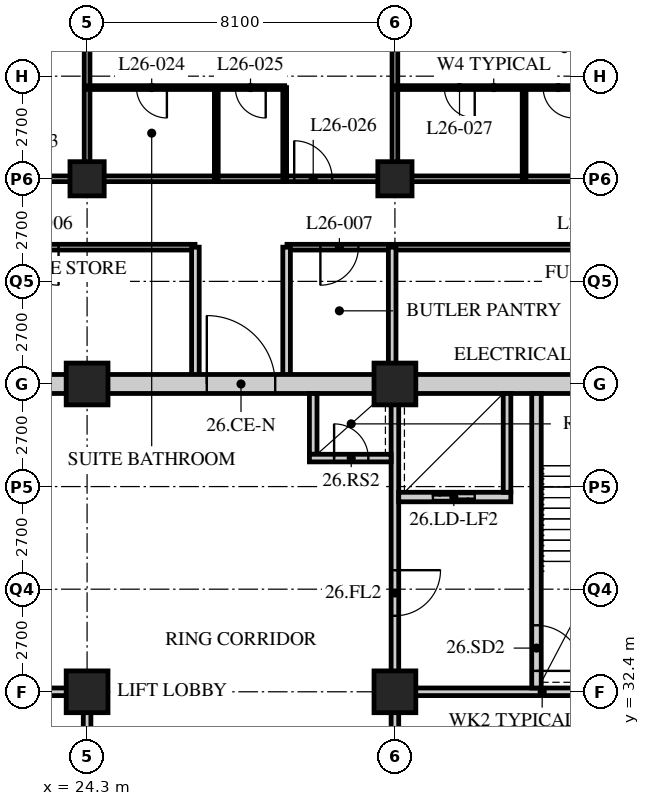
"""IFC4 building model, lengths in metres.
Left out: names, types, materials, properties, quantities, classifications, styles, units other than length and angle.
Written with IfcOpenShell. Run it as: python <this file> out.ifc"""

import sys

from ifc_helpers import new_model, si_unit, direction, frame, frame_2d, origin, origin_2d, place, context, subcontext, project, spatial, rectangle, hollow_rectangle, extrude, element, fill, save


model = new_model("IFC4")
c1 = context("Model", 3, precision=1e-05, world=origin(), true_north=direction((0.0, 1.0)))
c2 = subcontext(c1, "Body", "Model", "MODEL_VIEW")
j1 = project(units=[si_unit("LENGTHUNIT", "METRE"), si_unit("PLANEANGLEUNIT", "RADIAN")], contexts=[c1])
p1 = place(None, origin())
s1 = spatial("IfcSite", under=j1, at=p1, CompositionType="ELEMENT")
p2 = place(p1, origin())
s2 = spatial("IfcBuilding", under=s1, at=p2, CompositionType="ELEMENT")
p3 = place(p2, frame((0.0, 0.0, 106.8)))
s3 = spatial("IfcBuildingStorey", under=s2, at=p3, CompositionType="ELEMENT", Elevation=106.8)
for number, where, z_axis, x_axis in (
    (1, (24.3, 32.4, 0.0), (0.0, 0.0, 1.0), (1.0, 0.0, 0.0)),
    (2, (24.3, 40.5, 0.0), (0.0, 0.0, 1.0), (1.0, 0.0, 0.0)),
):
    element("IfcColumn", number, at=place(p3, frame(where, z_axis=z_axis, x_axis=x_axis)), inside=s3, PredefinedType="COLUMN", context=c2, shape_type="SweptSolid", body=[
        extrude(hollow_rectangle(XDim=1.1, YDim=1.1, WallThickness=0.1, at=origin_2d()), origin(), (0.0, 0.0, 1.0), 3.4),
    ])
p4 = place(p3, frame((24.3, 45.9, 0.0), z_axis=(0.0, 0.0, 1.0), x_axis=(1.0, 0.0, 0.0)))
e3 = element("IfcColumn", 3, at=p4, inside=s3, PredefinedType="COLUMN", context=c2, shape_type="SweptSolid", body=[
    extrude(hollow_rectangle(XDim=0.9, YDim=0.9, WallThickness=0.09, at=origin_2d()), origin(), (0.0, 0.0, 1.0), 3.4),
])
for number, where, z_axis, x_axis in (
    (4, (32.4, 32.4, 0.0), (0.0, 0.0, 1.0), (1.0, 0.0, 0.0)),
    (5, (32.4, 40.5, 0.0), (0.0, 0.0, 1.0), (1.0, 0.0, 0.0)),
):
    element("IfcColumn", number, at=place(p3, frame(where, z_axis=z_axis, x_axis=x_axis)), inside=s3, PredefinedType="COLUMN", context=c2, shape_type="SweptSolid", body=[
        extrude(hollow_rectangle(XDim=1.1, YDim=1.1, WallThickness=0.1, at=origin_2d()), origin(), (0.0, 0.0, 1.0), 3.4),
    ])
p5 = place(p3, frame((32.4, 45.9, 0.0), z_axis=(0.0, 0.0, 1.0), x_axis=(1.0, 0.0, 0.0)))
e6 = element("IfcColumn", 6, at=p5, inside=s3, PredefinedType="COLUMN", context=c2, shape_type="SweptSolid", body=[
    extrude(hollow_rectangle(XDim=0.9, YDim=0.9, WallThickness=0.09, at=origin_2d()), origin(), (0.0, 0.0, 1.0), 3.4),
])
p6 = place(p3, frame((12.15, 45.9, 0.0), z_axis=(0.0, 0.0, 1.0), x_axis=(1.0, 0.0, 0.0)))
e7 = element("IfcWall", 7, at=p6, inside=s3, PredefinedType="PARTITIONING", context=c2, shape_type="SweptSolid", body=[
    extrude(rectangle(XDim=32.4, YDim=0.15, at=frame_2d((16.2, 0.0))), origin(), (0.0, 0.0, 1.0), 2.578),
])
p7 = place(p6, frame((9.5, 0.0, 0.0)))
e8 = element("IfcOpeningElement", 8, at=p7, cuts=e7, PredefinedType="OPENING", context=c2, shape_type="SweptSolid", body=[
    extrude(rectangle(XDim=1.0, YDim=2.1, at=frame_2d((0.5, 1.05))), frame((0.0, 0.085, 0.0), z_axis=(0.0, -1.0, 0.0), x_axis=(1.0, 0.0, 0.0)), (0.0, 0.0, 1.0), 0.17),
])
p8 = place(p6, frame((17.6, 0.0, 0.0)))
e9 = element("IfcOpeningElement", 9, at=p8, cuts=e7, PredefinedType="OPENING", context=c2, shape_type="SweptSolid", body=[
    extrude(rectangle(XDim=1.0, YDim=2.1, at=frame_2d((0.5, 1.05))), frame((0.0, 0.085, 0.0), z_axis=(0.0, -1.0, 0.0), x_axis=(1.0, 0.0, 0.0)), (0.0, 0.0, 1.0), 0.17),
])
p9 = place(p6, frame((25.7, 0.0, 0.0)))
e10 = element("IfcOpeningElement", 10, at=p9, cuts=e7, PredefinedType="OPENING", context=c2, shape_type="SweptSolid", body=[
    extrude(rectangle(XDim=1.0, YDim=2.1, at=frame_2d((0.5, 1.05))), frame((0.0, 0.085, 0.0), z_axis=(0.0, -1.0, 0.0), x_axis=(1.0, 0.0, 0.0)), (0.0, 0.0, 1.0), 0.17),
])
p10 = place(p6, frame((29.875, 0.0, 0.0)))
e11 = element("IfcOpeningElement", 11, at=p10, cuts=e7, PredefinedType="OPENING", context=c2, shape_type="SweptSolid", body=[
    extrude(rectangle(XDim=1.0, YDim=2.1, at=frame_2d((0.5, 1.05))), frame((0.0, 0.085, 0.0), z_axis=(0.0, -1.0, 0.0), x_axis=(1.0, 0.0, 0.0)), (0.0, 0.0, 1.0), 0.17),
])
p11 = place(p6, frame((1.525, 0.0, 0.0)))
e12 = element("IfcOpeningElement", 12, at=p11, cuts=e7, PredefinedType="OPENING", context=c2, shape_type="SweptSolid", body=[
    extrude(rectangle(XDim=1.0, YDim=2.1, at=frame_2d((0.5, 1.05))), frame((0.0, 0.085, 0.0), z_axis=(0.0, -1.0, 0.0), x_axis=(1.0, 0.0, 0.0)), (0.0, 0.0, 1.0), 0.17),
])
p12 = place(p3, frame((42.75, 44.1, 0.0), z_axis=(0.0, 0.0, 1.0), x_axis=(-1.0, 0.0, 0.0)))
e13 = element("IfcWall", 13, at=p12, inside=s3, PredefinedType="PARTITIONING", context=c2, shape_type="SweptSolid", body=[
    extrude(rectangle(XDim=13.19, YDim=0.15, at=frame_2d((6.595, 0.0))), origin(), (0.0, 0.0, 1.0), 3.19),
])
p13 = place(p12, frame((11.311, 0.0, 0.0)))
e14 = element("IfcOpeningElement", 14, at=p13, cuts=e13, PredefinedType="OPENING", context=c2, shape_type="SweptSolid", body=[
    extrude(rectangle(XDim=1.0, YDim=2.1, at=frame_2d((0.5, 1.05))), frame((0.0, 0.085, 0.0), z_axis=(0.0, -1.0, 0.0), x_axis=(1.0, 0.0, 0.0)), (0.0, 0.0, 1.0), 0.17),
])
p14 = place(p12, frame((4.711, 0.0, 0.0)))
e15 = element("IfcOpeningElement", 15, at=p14, cuts=e13, PredefinedType="OPENING", context=c2, shape_type="SweptSolid", body=[
    extrude(rectangle(XDim=1.0, YDim=2.1, at=frame_2d((0.5, 1.05))), frame((0.0, 0.085, 0.0), z_axis=(0.0, -1.0, 0.0), x_axis=(1.0, 0.0, 0.0)), (0.0, 0.0, 1.0), 0.17),
])
p15 = place(p3, frame((27.14, 44.1, 0.0), z_axis=(0.0, 0.0, 1.0), x_axis=(-1.0, 0.0, 0.0)))
e16 = element("IfcWall", 16, at=p15, inside=s3, PredefinedType="PARTITIONING", context=c2, shape_type="SweptSolid", body=[
    extrude(rectangle(XDim=13.19, YDim=0.15, at=frame_2d((6.595, 0.0))), origin(), (0.0, 0.0, 1.0), 3.19),
])
p16 = place(p15, frame((10.19, 0.0, 0.0)))
e17 = element("IfcOpeningElement", 17, at=p16, cuts=e16, PredefinedType="OPENING", context=c2, shape_type="SweptSolid", body=[
    extrude(rectangle(XDim=1.0, YDim=2.1, at=frame_2d((0.5, 1.05))), frame((0.0, 0.085, 0.0), z_axis=(0.0, -1.0, 0.0), x_axis=(1.0, 0.0, 0.0)), (0.0, 0.0, 1.0), 0.17),
])
p17 = place(p15, frame((3.59, 0.0, 0.0)))
e18 = element("IfcOpeningElement", 18, at=p17, cuts=e16, PredefinedType="OPENING", context=c2, shape_type="SweptSolid", body=[
    extrude(rectangle(XDim=1.0, YDim=2.1, at=frame_2d((0.5, 1.05))), frame((0.0, 0.085, 0.0), z_axis=(0.0, -1.0, 0.0), x_axis=(1.0, 0.0, 0.0)), (0.0, 0.0, 1.0), 0.17),
])
p18 = place(p3, frame((32.328, 44.1, 0.0), z_axis=(0.0, 0.0, 1.0), x_axis=(0.0, -1.0, 0.0)))
e19 = element("IfcWall", 19, at=p18, inside=s3, PredefinedType="SOLIDWALL", context=c2, shape_type="SweptSolid", body=[
    extrude(rectangle(XDim=3.6, YDim=0.2, at=frame_2d((1.8, 0.0))), origin(), (0.0, 0.0, 1.0), 2.578),
])
for number, where, z_axis, x_axis in (
    (20, (27.15, 40.5, 0.0), (0.0, 0.0, 1.0), (0.0, 1.0, 0.0)),
    (21, (29.55, 40.5, 0.0), (0.0, 0.0, 1.0), (0.0, 1.0, 0.0)),
):
    element("IfcWall", number, at=place(p3, frame(where, z_axis=z_axis, x_axis=x_axis)), inside=s3, PredefinedType="SOLIDWALL", context=c2, shape_type="SweptSolid", body=[
        extrude(rectangle(XDim=3.6, YDim=0.2, at=frame_2d((1.8, 0.0))), origin(), (0.0, 0.0, 1.0), 3.19),
    ])
p19 = place(p3, frame((24.3, 45.9, 0.0), z_axis=(0.0, 0.0, 1.0), x_axis=(0.0, 1.0, 0.0)))
e22 = element("IfcWall", 22, at=p19, inside=s3, PredefinedType="PARTITIONING", context=c2, shape_type="SweptSolid", body=[
    extrude(rectangle(XDim=7.8, YDim=0.15, at=frame_2d((3.9, 0.0))), origin(), (0.0, 0.0, 1.0), 2.578),
])
p20 = place(p3, frame((24.3, 48.3, 0.0), z_axis=(0.0, 0.0, 1.0), x_axis=(1.0, 0.0, 0.0)))
e23 = element("IfcWall", 23, at=p20, inside=s3, PredefinedType="PARTITIONING", context=c2, shape_type="SweptSolid", body=[
    extrude(rectangle(XDim=5.2, YDim=0.1, at=frame_2d((2.6, 0.0))), origin(), (0.0, 0.0, 1.0), 3.19),
])
p21 = place(p20, frame((1.3, 0.0, 0.0)))
e24 = element("IfcOpeningElement", 24, at=p21, cuts=e23, PredefinedType="OPENING", context=c2, shape_type="SweptSolid", body=[
    extrude(rectangle(XDim=0.8, YDim=2.1, at=frame_2d((0.4, 1.05))), frame((0.0, 0.06, 0.0), z_axis=(0.0, -1.0, 0.0), x_axis=(1.0, 0.0, 0.0)), (0.0, 0.0, 1.0), 0.12),
])
p22 = place(p20, frame((3.9, 0.0, 0.0)))
e25 = element("IfcOpeningElement", 25, at=p22, cuts=e23, PredefinedType="OPENING", context=c2, shape_type="SweptSolid", body=[
    extrude(rectangle(XDim=0.8, YDim=2.1, at=frame_2d((0.4, 1.05))), frame((0.0, 0.06, 0.0), z_axis=(0.0, -1.0, 0.0), x_axis=(1.0, 0.0, 0.0)), (0.0, 0.0, 1.0), 0.12),
])
for number, where, z_axis, x_axis in (
    (26, (27.7, 45.9, 0.0), (0.0, 0.0, 1.0), (0.0, 1.0, 0.0)),
    (27, (29.5, 45.9, 0.0), (0.0, 0.0, 1.0), (0.0, 1.0, 0.0)),
):
    element("IfcWall", number, at=place(p3, frame(where, z_axis=z_axis, x_axis=x_axis)), inside=s3, PredefinedType="PARTITIONING", context=c2, shape_type="SweptSolid", body=[
        extrude(rectangle(XDim=2.4, YDim=0.1, at=frame_2d((1.2, 0.0))), origin(), (0.0, 0.0, 1.0), 3.19),
    ])
p23 = place(p3, frame((32.4, 45.9, 0.0), z_axis=(0.0, 0.0, 1.0), x_axis=(0.0, 1.0, 0.0)))
e28 = element("IfcWall", 28, at=p23, inside=s3, PredefinedType="PARTITIONING", context=c2, shape_type="SweptSolid", body=[
    extrude(rectangle(XDim=7.8, YDim=0.15, at=frame_2d((3.9, 0.0))), origin(), (0.0, 0.0, 1.0), 2.578),
])
p24 = place(p3, frame((32.4, 48.3, 0.0), z_axis=(0.0, 0.0, 1.0), x_axis=(1.0, 0.0, 0.0)))
e29 = element("IfcWall", 29, at=p24, inside=s3, PredefinedType="PARTITIONING", context=c2, shape_type="SweptSolid", body=[
    extrude(rectangle(XDim=5.2, YDim=0.1, at=frame_2d((2.6, 0.0))), origin(), (0.0, 0.0, 1.0), 3.19),
])
p25 = place(p24, frame((1.3, 0.0, 0.0)))
e30 = element("IfcOpeningElement", 30, at=p25, cuts=e29, PredefinedType="OPENING", context=c2, shape_type="SweptSolid", body=[
    extrude(rectangle(XDim=0.8, YDim=2.1, at=frame_2d((0.4, 1.05))), frame((0.0, 0.06, 0.0), z_axis=(0.0, -1.0, 0.0), x_axis=(1.0, 0.0, 0.0)), (0.0, 0.0, 1.0), 0.12),
])
p26 = place(p24, frame((3.9, 0.0, 0.0)))
e31 = element("IfcOpeningElement", 31, at=p26, cuts=e29, PredefinedType="OPENING", context=c2, shape_type="SweptSolid", body=[
    extrude(rectangle(XDim=0.8, YDim=2.1, at=frame_2d((0.4, 1.05))), frame((0.0, 0.06, 0.0), z_axis=(0.0, -1.0, 0.0), x_axis=(1.0, 0.0, 0.0)), (0.0, 0.0, 1.0), 0.12),
])
p27 = place(p3, frame((35.8, 45.9, 0.0), z_axis=(0.0, 0.0, 1.0), x_axis=(0.0, 1.0, 0.0)))
e32 = element("IfcWall", 32, at=p27, inside=s3, PredefinedType="PARTITIONING", context=c2, shape_type="SweptSolid", body=[
    extrude(rectangle(XDim=2.4, YDim=0.1, at=frame_2d((1.2, 0.0))), origin(), (0.0, 0.0, 1.0), 3.19),
])
p28 = place(p3, frame((15.95, 40.5, 0.0), z_axis=(0.0, 0.0, 1.0), x_axis=(1.0, 0.0, 0.0)))
e33 = element("IfcWall", 33, at=p28, inside=s3, PredefinedType="SOLIDWALL", context=c2, shape_type="SweptSolid", body=[
    extrude(rectangle(XDim=24.8, YDim=0.5, at=frame_2d((12.4, 0.0))), origin(), (0.0, 0.0, 1.0), 2.54),
])
p29 = place(p28, frame((11.5, 0.0, 0.0)))
e34 = element("IfcOpeningElement", 34, at=p29, cuts=e33, PredefinedType="OPENING", context=c2, shape_type="SweptSolid", body=[
    extrude(rectangle(XDim=1.8, YDim=2.4, at=frame_2d((0.9, 1.2))), frame((0.0, 0.26, 0.0), z_axis=(0.0, -1.0, 0.0), x_axis=(1.0, 0.0, 0.0)), (0.0, 0.0, 1.0), 0.52),
])
p30 = place(p3, frame((16.45, 32.4, 0.0), z_axis=(0.0, 0.0, 1.0), x_axis=(1.0, 0.0, 0.0)))
e35 = element("IfcWall", 35, at=p30, inside=s3, PredefinedType="SOLIDWALL", context=c2, shape_type="SweptSolid", body=[
    extrude(rectangle(XDim=7.95, YDim=0.2, at=frame_2d((3.975, 0.0))), origin(), (0.0, 0.0, 1.0), 2.578),
])
p31 = place(p3, frame((24.3, 24.55, 0.0), z_axis=(0.0, 0.0, 1.0), x_axis=(0.0, 1.0, 0.0)))
e36 = element("IfcWall", 36, at=p31, inside=s3, PredefinedType="SOLIDWALL", context=c2, shape_type="SweptSolid", body=[
    extrude(rectangle(XDim=7.75, YDim=0.2, at=frame_2d((3.875, 0.0))), origin(), (0.0, 0.0, 1.0), 2.578),
])
p32 = place(p31, frame((4.6, 0.0, 0.0)))
e37 = element("IfcOpeningElement", 37, at=p32, cuts=e36, PredefinedType="OPENING", context=c2, shape_type="SweptSolid", body=[
    extrude(rectangle(XDim=1.2, YDim=2.1, at=frame_2d((0.6, 1.05))), frame((0.0, 0.11, 0.0), z_axis=(0.0, -1.0, 0.0), x_axis=(1.0, 0.0, 0.0)), (0.0, 0.0, 1.0), 0.22),
])
p33 = place(p3, frame((32.3, 32.4, 0.0), z_axis=(0.0, 0.0, 1.0), x_axis=(1.0, 0.0, 0.0)))
e38 = element("IfcWall", 38, at=p33, inside=s3, PredefinedType="SOLIDWALL", context=c2, shape_type="SweptSolid", body=[
    extrude(rectangle(XDim=7.95, YDim=0.2, at=frame_2d((3.975, 0.0))), origin(), (0.0, 0.0, 1.0), 2.578),
])
p34 = place(p3, frame((32.4, 32.5, 0.0), z_axis=(0.0, 0.0, 1.0), x_axis=(0.0, 1.0, 0.0)))
e39 = element("IfcWall", 39, at=p34, inside=s3, PredefinedType="SOLIDWALL", context=c2, shape_type="SweptSolid", body=[
    extrude(rectangle(XDim=7.75, YDim=0.2, at=frame_2d((3.875, 0.0))), origin(), (0.0, 0.0, 1.0), 2.578),
])
p35 = place(p34, frame((1.9, 0.0, 0.0)))
e40 = element("IfcOpeningElement", 40, at=p35, cuts=e39, PredefinedType="OPENING", context=c2, shape_type="SweptSolid", body=[
    extrude(rectangle(XDim=1.2, YDim=2.1, at=frame_2d((0.6, 1.05))), frame((0.0, 0.11, 0.0), z_axis=(0.0, -1.0, 0.0), x_axis=(1.0, 0.0, 0.0)), (0.0, 0.0, 1.0), 0.22),
])
p36 = place(p3, frame((36.125, 32.5, 0.0), z_axis=(0.0, 0.0, 1.0), x_axis=(0.0, 1.0, 0.0)))
e41 = element("IfcWall", 41, at=p36, inside=s3, PredefinedType="SOLIDWALL", context=c2, shape_type="SweptSolid", body=[
    extrude(rectangle(XDim=7.75, YDim=0.25, at=frame_2d((3.875, 0.0))), origin(), (0.0, 0.0, 1.0), 3.19),
])
p37 = place(p36, frame((0.45, 0.0, 0.0)))
e42 = element("IfcOpeningElement", 42, at=p37, cuts=e41, PredefinedType="OPENING", context=c2, shape_type="SweptSolid", body=[
    extrude(rectangle(XDim=1.2, YDim=2.1, at=frame_2d((0.6, 1.05))), frame((0.0, 0.135, 0.0), z_axis=(0.0, -1.0, 0.0), x_axis=(1.0, 0.0, 0.0)), (0.0, 0.0, 1.0), 0.27),
])
p38 = place(p3, frame((32.5, 37.525, 0.0), z_axis=(0.0, 0.0, 1.0), x_axis=(1.0, 0.0, 0.0)))
e43 = element("IfcWall", 43, at=p38, inside=s3, PredefinedType="SOLIDWALL", context=c2, shape_type="SweptSolid", body=[
    extrude(rectangle(XDim=2.95, YDim=0.25, at=frame_2d((1.475, 0.0))), origin(), (0.0, 0.0, 1.0), 3.19),
])
p39 = place(p38, frame((0.9, 0.0, 0.0)))
e44 = element("IfcOpeningElement", 44, at=p39, cuts=e43, PredefinedType="OPENING", context=c2, shape_type="SweptSolid", body=[
    extrude(rectangle(XDim=1.1, YDim=2.4, at=frame_2d((0.55, 1.2))), frame((0.0, 0.135, 0.0), z_axis=(0.0, -1.0, 0.0), x_axis=(1.0, 0.0, 0.0)), (0.0, 0.0, 1.0), 0.27),
])
p40 = place(p3, frame((35.35, 37.65, 0.0), z_axis=(0.0, 0.0, 1.0), x_axis=(0.0, 1.0, 0.0)))
e45 = element("IfcWall", 45, at=p40, inside=s3, PredefinedType="SOLIDWALL", context=c2, shape_type="SweptSolid", body=[
    extrude(rectangle(XDim=2.6, YDim=0.2, at=frame_2d((1.3, 0.0))), origin(), (0.0, 0.0, 1.0), 3.19),
])
p41 = place(p3, frame((30.25, 38.65, 0.0), z_axis=(0.0, 0.0, 1.0), x_axis=(0.0, 1.0, 0.0)))
e46 = element("IfcWall", 46, at=p41, inside=s3, PredefinedType="SOLIDWALL", context=c2, shape_type="SweptSolid", body=[
    extrude(rectangle(XDim=1.6, YDim=0.2, at=frame_2d((0.8, 0.0))), origin(), (0.0, 0.0, 1.0), 3.19),
])
p42 = place(p3, frame((30.15, 38.55, 0.0), z_axis=(0.0, 0.0, 1.0), x_axis=(1.0, 0.0, 0.0)))
e47 = element("IfcWall", 47, at=p42, inside=s3, PredefinedType="SOLIDWALL", context=c2, shape_type="SweptSolid", body=[
    extrude(rectangle(XDim=2.15, YDim=0.2, at=frame_2d((1.075, 0.0))), origin(), (0.0, 0.0, 1.0), 3.19),
])
p43 = place(p42, frame((0.65, 0.0, 0.0)))
e48 = element("IfcOpeningElement", 48, at=p43, cuts=e47, PredefinedType="OPENING", context=c2, shape_type="SweptSolid", body=[
    extrude(rectangle(XDim=0.9, YDim=2.1, at=frame_2d((0.45, 1.05))), frame((0.0, 0.11, 0.0), z_axis=(0.0, -1.0, 0.0), x_axis=(1.0, 0.0, 0.0)), (0.0, 0.0, 1.0), 0.22),
])
p44 = place(p3, frame((32.4, 24.55, 0.0), z_axis=(0.0, 0.0, 1.0), x_axis=(0.0, 1.0, 0.0)))
e49 = element("IfcWall", 49, at=p44, inside=s3, PredefinedType="PARTITIONING", context=c2, shape_type="SweptSolid", body=[
    extrude(rectangle(XDim=7.75, YDim=0.2, at=frame_2d((3.875, 0.0))), origin(), (0.0, 0.0, 1.0), 2.578),
])
p45 = place(p44, frame((1.4, 0.0, 0.0)))
e50 = element("IfcOpeningElement", 50, at=p45, cuts=e49, PredefinedType="OPENING", context=c2, shape_type="SweptSolid", body=[
    extrude(rectangle(XDim=0.9, YDim=2.1, at=frame_2d((0.45, 1.05))), frame((0.0, 0.11, 0.0), z_axis=(0.0, -1.0, 0.0), x_axis=(1.0, 0.0, 0.0)), (0.0, 0.0, 1.0), 0.22),
])
p46 = place(p44, frame((5.35, 0.0, 0.0)))
e51 = element("IfcOpeningElement", 51, at=p46, cuts=e49, PredefinedType="OPENING", context=c2, shape_type="SweptSolid", body=[
    extrude(rectangle(XDim=0.9, YDim=2.1, at=frame_2d((0.45, 1.05))), frame((0.0, 0.11, 0.0), z_axis=(0.0, -1.0, 0.0), x_axis=(1.0, 0.0, 0.0)), (0.0, 0.0, 1.0), 0.22),
])
p47 = place(p17, origin())
e52 = element("IfcDoor", 52, at=p47, inside=s3, OperationType="SINGLE_SWING_LEFT", PredefinedType="DOOR", context=c2, shape_type="SweptSolid", body=[
    extrude(rectangle(XDim=1.0, YDim=2.1, at=frame_2d((0.5, 1.05))), frame((0.0, 0.025, 0.0), z_axis=(0.0, -1.0, 0.0), x_axis=(1.0, 0.0, 0.0)), (0.0, 0.0, 1.0), 0.05),
])
fill(e18, e52)
p48 = place(p13, origin())
e53 = element("IfcDoor", 53, at=p48, inside=s3, OperationType="SINGLE_SWING_RIGHT", PredefinedType="DOOR", context=c2, shape_type="SweptSolid", body=[
    extrude(rectangle(XDim=1.0, YDim=2.1, at=frame_2d((0.5, 1.05))), frame((0.0, 0.025, 0.0), z_axis=(0.0, -1.0, 0.0), x_axis=(1.0, 0.0, 0.0)), (0.0, 0.0, 1.0), 0.05),
])
fill(e14, e53)
p49 = place(p21, origin())
e54 = element("IfcDoor", 54, at=p49, inside=s3, OperationType="SINGLE_SWING_LEFT", PredefinedType="DOOR", context=c2, shape_type="SweptSolid", body=[
    extrude(rectangle(XDim=0.8, YDim=2.1, at=frame_2d((0.4, 1.05))), frame((0.0, 0.025, 0.0), z_axis=(0.0, -1.0, 0.0), x_axis=(1.0, 0.0, 0.0)), (0.0, 0.0, 1.0), 0.05),
])
fill(e24, e54)
p50 = place(p22, origin())
e55 = element("IfcDoor", 55, at=p50, inside=s3, OperationType="SINGLE_SWING_LEFT", PredefinedType="DOOR", context=c2, shape_type="SweptSolid", body=[
    extrude(rectangle(XDim=0.8, YDim=2.1, at=frame_2d((0.4, 1.05))), frame((0.0, 0.025, 0.0), z_axis=(0.0, -1.0, 0.0), x_axis=(1.0, 0.0, 0.0)), (0.0, 0.0, 1.0), 0.05),
])
fill(e25, e55)
p51 = place(p8, origin())
e56 = element("IfcDoor", 56, at=p51, inside=s3, OperationType="SINGLE_SWING_LEFT", PredefinedType="DOOR", context=c2, shape_type="SweptSolid", body=[
    extrude(rectangle(XDim=1.0, YDim=2.1, at=frame_2d((0.5, 1.05))), frame((0.0, 0.025, 0.0), z_axis=(0.0, -1.0, 0.0), x_axis=(1.0, 0.0, 0.0)), (0.0, 0.0, 1.0), 0.05),
])
fill(e9, e56)
p52 = place(p25, origin())
e57 = element("IfcDoor", 57, at=p52, inside=s3, OperationType="SINGLE_SWING_LEFT", PredefinedType="DOOR", context=c2, shape_type="SweptSolid", body=[
    extrude(rectangle(XDim=0.8, YDim=2.1, at=frame_2d((0.4, 1.05))), frame((0.0, 0.025, 0.0), z_axis=(0.0, -1.0, 0.0), x_axis=(1.0, 0.0, 0.0)), (0.0, 0.0, 1.0), 0.05),
])
fill(e30, e57)
p53 = place(p26, origin())
e58 = element("IfcDoor", 58, at=p53, inside=s3, OperationType="SINGLE_SWING_LEFT", PredefinedType="DOOR", context=c2, shape_type="SweptSolid", body=[
    extrude(rectangle(XDim=0.8, YDim=2.1, at=frame_2d((0.4, 1.05))), frame((0.0, 0.025, 0.0), z_axis=(0.0, -1.0, 0.0), x_axis=(1.0, 0.0, 0.0)), (0.0, 0.0, 1.0), 0.05),
])
fill(e31, e58)
p54 = place(p37, origin())
e59 = element("IfcDoor", 59, at=p54, inside=s3, OperationType="SINGLE_SWING_RIGHT", PredefinedType="DOOR", context=c2, shape_type="SweptSolid", body=[
    extrude(rectangle(XDim=1.2, YDim=2.1, at=frame_2d((0.6, 1.05))), frame((0.0, 0.025, 0.0), z_axis=(0.0, -1.0, 0.0), x_axis=(1.0, 0.0, 0.0)), (0.0, 0.0, 1.0), 0.05),
])
fill(e42, e59)
p55 = place(p35, origin())
e60 = element("IfcDoor", 60, at=p55, inside=s3, OperationType="SINGLE_SWING_LEFT", PredefinedType="DOOR", context=c2, shape_type="SweptSolid", body=[
    extrude(rectangle(XDim=1.2, YDim=2.1, at=frame_2d((0.6, 1.05))), frame((0.0, 0.025, 0.0), z_axis=(0.0, -1.0, 0.0), x_axis=(1.0, 0.0, 0.0)), (0.0, 0.0, 1.0), 0.05),
])
fill(e40, e60)
p56 = place(p43, origin())
e61 = element("IfcDoor", 61, at=p56, inside=s3, OperationType="SINGLE_SWING_LEFT", PredefinedType="DOOR", context=c2, shape_type="SweptSolid", body=[
    extrude(rectangle(XDim=0.9, YDim=2.1, at=frame_2d((0.45, 1.05))), frame((0.0, 0.025, 0.0), z_axis=(0.0, -1.0, 0.0), x_axis=(1.0, 0.0, 0.0)), (0.0, 0.0, 1.0), 0.05),
])
fill(e48, e61)
p57 = place(p39, origin())
e62 = element("IfcDoor", 62, at=p57, inside=s3, OperationType="DOUBLE_DOOR_SLIDING", PredefinedType="DOOR", context=c2, shape_type="SweptSolid", body=[
    extrude(rectangle(XDim=1.1, YDim=2.4, at=frame_2d((0.55, 1.2))), frame((0.0, 0.025, 0.0), z_axis=(0.0, -1.0, 0.0), x_axis=(1.0, 0.0, 0.0)), (0.0, 0.0, 1.0), 0.05),
])
fill(e44, e62)
p58 = place(p29, origin())
e63 = element("IfcDoor", 63, at=p58, inside=s3, OperationType="DOUBLE_DOOR_SINGLE_SWING", PredefinedType="DOOR", context=c2, shape_type="SweptSolid", body=[
    extrude(rectangle(XDim=1.8, YDim=2.4, at=frame_2d((0.9, 1.2))), frame((0.0, 0.025, 0.0), z_axis=(0.0, -1.0, 0.0), x_axis=(1.0, 0.0, 0.0)), (0.0, 0.0, 1.0), 0.05),
])
fill(e34, e63)
save(model, sys.argv[1])
